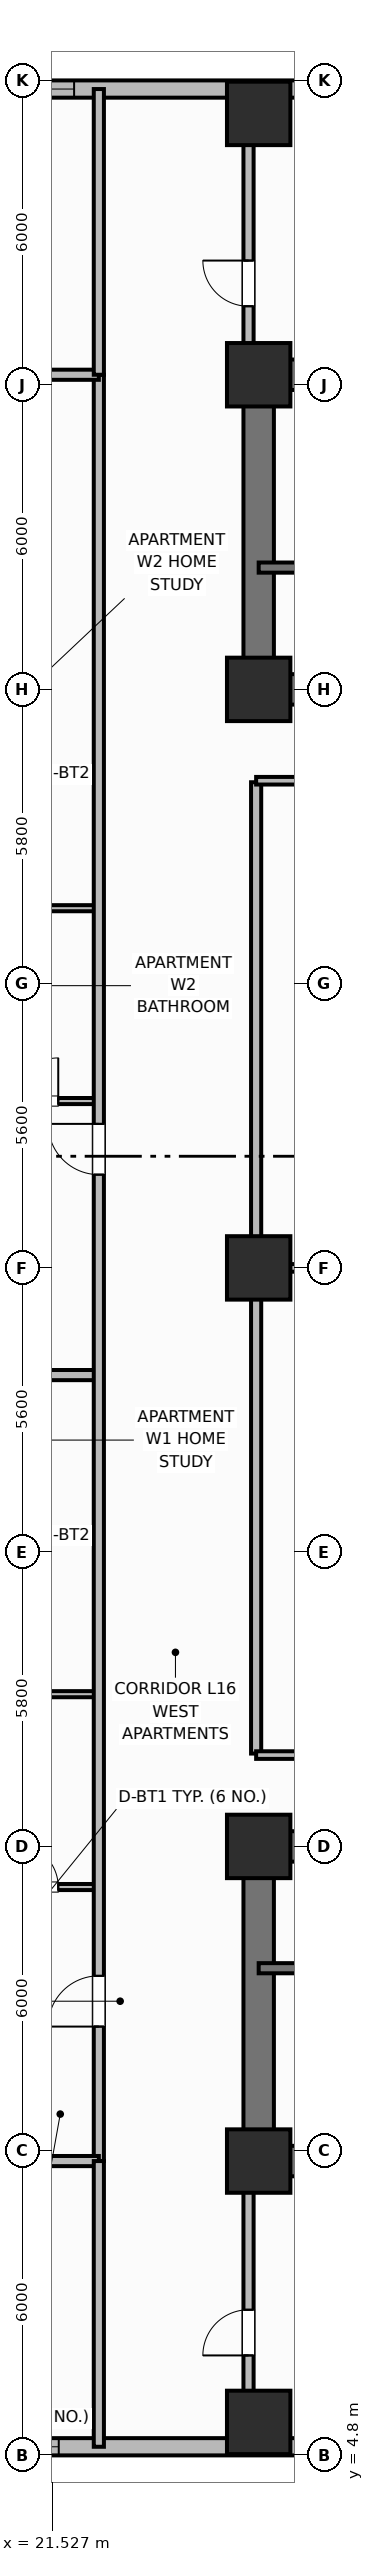
"""IFC4 building model, lengths in metres.
Left out: names, types, materials, properties, quantities, classifications, styles, units other than length and angle.
Written with IfcOpenShell. Run it as: python <this file> out.ifc"""

import sys

from ifc_helpers import new_model, si_unit, direction, frame, frame_2d, origin, origin_2d, place, context, subcontext, project, spatial, rectangle, extrude, element, fill, save


model = new_model("IFC4")
c1 = context("Model", 3, precision=1e-05, world=origin(), true_north=direction((0.0, 1.0)))
c2 = subcontext(c1, "Body", "Model", "MODEL_VIEW")
j1 = project(units=[si_unit("LENGTHUNIT", "METRE"), si_unit("PLANEANGLEUNIT", "RADIAN")], contexts=[c1])
p1 = place(None, origin())
s1 = spatial("IfcSite", under=j1, at=p1, CompositionType="ELEMENT")
p2 = place(p1, origin())
s2 = spatial("IfcBuilding", under=s1, at=p2, CompositionType="ELEMENT")
p3 = place(p2, frame((0.0, 0.0, 65.8)))
s3 = spatial("IfcBuildingStorey", under=s2, at=p3, CompositionType="ELEMENT", Elevation=65.8)
p4 = place(p3, frame((52.8, 10.6, 0.0), z_axis=(0.0, 0.0, 1.0), x_axis=(-1.0, 0.0, 0.0)))
e1 = element("IfcWall", 1, at=p4, inside=s3, PredefinedType="SHEAR", context=c2, shape_type="SweptSolid", body=[
    extrude(rectangle(XDim=27.2, YDim=0.6, at=frame_2d((13.6, 0.0))), origin(), (0.0, 0.0, 1.0), 3.7),
])
p5 = place(p3, frame((25.6, 10.9, 0.0), z_axis=(0.0, 0.0, 1.0), x_axis=(0.0, 1.0, 0.0)))
e2 = element("IfcWall", 2, at=p5, inside=s3, PredefinedType="SHEAR", context=c2, shape_type="SweptSolid", body=[
    extrude(rectangle(XDim=5.6, YDim=0.6, at=frame_2d((2.8, 0.0))), origin(), (0.0, 0.0, 1.0), 3.7),
])
p6 = place(p3, frame((25.6, 16.8, 0.0), z_axis=(0.0, 0.0, 1.0), x_axis=(1.0, 0.0, 0.0)))
e3 = element("IfcWall", 3, at=p6, inside=s3, PredefinedType="SHEAR", context=c2, shape_type="SweptSolid", body=[
    extrude(rectangle(XDim=27.2, YDim=0.6, at=frame_2d((13.6, 0.0))), origin(), (0.0, 0.0, 1.0), 3.7),
])
p7 = place(p6, frame((1.9, 0.0, 0.0)))
e4 = element("IfcOpeningElement", 4, at=p7, cuts=e3, PredefinedType="OPENING", context=c2, shape_type="SweptSolid", body=[
    extrude(rectangle(XDim=1.1, YDim=2.15, at=frame_2d((0.55, 1.075))), frame((0.0, 0.31, 0.0), z_axis=(0.0, -1.0, 0.0), x_axis=(1.0, 0.0, 0.0)), (0.0, 0.0, 1.0), 0.62),
])
p8 = place(p6, frame((13.0, 0.0, 0.0)))
e5 = element("IfcOpeningElement", 5, at=p8, cuts=e3, PredefinedType="OPENING", context=c2, shape_type="SweptSolid", body=[
    extrude(rectangle(XDim=1.2, YDim=2.15, at=frame_2d((0.6, 1.075))), frame((0.0, 0.31, 0.0), z_axis=(0.0, -1.0, 0.0), x_axis=(1.0, 0.0, 0.0)), (0.0, 0.0, 1.0), 0.62),
])
p9 = place(p6, frame((20.4, 0.0, 0.0)))
e6 = element("IfcOpeningElement", 6, at=p9, cuts=e3, PredefinedType="OPENING", context=c2, shape_type="SweptSolid", body=[
    extrude(rectangle(XDim=1.3, YDim=2.2, at=frame_2d((0.65, 1.1))), frame((0.0, 0.31, 0.0), z_axis=(0.0, -1.0, 0.0), x_axis=(1.0, 0.0, 0.0)), (0.0, 0.0, 1.0), 0.62),
])
p10 = place(p6, frame((24.65, 0.0, 0.0)))
e7 = element("IfcOpeningElement", 7, at=p10, cuts=e3, PredefinedType="OPENING", context=c2, shape_type="SweptSolid", body=[
    extrude(rectangle(XDim=0.85, YDim=2.1, at=frame_2d((0.425, 1.05))), frame((0.0, 0.31, 0.0), z_axis=(0.0, -1.0, 0.0), x_axis=(1.0, 0.0, 0.0)), (0.0, 0.0, 1.0), 0.62),
])
p11 = place(p3, frame((25.6, 45.8, 0.0), z_axis=(0.0, 0.0, 1.0), x_axis=(1.0, 0.0, 0.0)))
e8 = element("IfcWall", 8, at=p11, inside=s3, PredefinedType="SHEAR", context=c2, shape_type="SweptSolid", body=[
    extrude(rectangle(XDim=27.2, YDim=0.6, at=frame_2d((13.6, 0.0))), origin(), (0.0, 0.0, 1.0), 3.7),
])
p12 = place(p3, frame((25.6, 39.9, 0.0), z_axis=(0.0, 0.0, 1.0), x_axis=(0.0, 1.0, 0.0)))
e9 = element("IfcWall", 9, at=p12, inside=s3, PredefinedType="SHEAR", context=c2, shape_type="SweptSolid", body=[
    extrude(rectangle(XDim=5.6, YDim=0.6, at=frame_2d((2.8, 0.0))), origin(), (0.0, 0.0, 1.0), 3.7),
])
p13 = place(p3, frame((52.8, 39.6, 0.0), z_axis=(0.0, 0.0, 1.0), x_axis=(-1.0, 0.0, 0.0)))
e10 = element("IfcWall", 10, at=p13, inside=s3, PredefinedType="SHEAR", context=c2, shape_type="SweptSolid", body=[
    extrude(rectangle(XDim=27.2, YDim=0.6, at=frame_2d((13.6, 0.0))), origin(), (0.0, 0.0, 1.0), 3.7),
])
p14 = place(p13, frame((24.2, 0.0, 0.0)))
e11 = element("IfcOpeningElement", 11, at=p14, cuts=e10, PredefinedType="OPENING", context=c2, shape_type="SweptSolid", body=[
    extrude(rectangle(XDim=1.1, YDim=2.15, at=frame_2d((0.55, 1.075))), frame((0.0, 0.31, 0.0), z_axis=(0.0, -1.0, 0.0), x_axis=(1.0, 0.0, 0.0)), (0.0, 0.0, 1.0), 0.62),
])
p15 = place(p13, frame((15.1, 0.0, 0.0)))
e12 = element("IfcOpeningElement", 12, at=p15, cuts=e10, PredefinedType="OPENING", context=c2, shape_type="SweptSolid", body=[
    extrude(rectangle(XDim=1.2, YDim=2.15, at=frame_2d((0.6, 1.075))), frame((0.0, 0.31, 0.0), z_axis=(0.0, -1.0, 0.0), x_axis=(1.0, 0.0, 0.0)), (0.0, 0.0, 1.0), 0.62),
])
p16 = place(p13, frame((11.6, 0.0, 0.0)))
e13 = element("IfcOpeningElement", 13, at=p16, cuts=e10, PredefinedType="OPENING", context=c2, shape_type="SweptSolid", body=[
    extrude(rectangle(XDim=0.9, YDim=2.1, at=frame_2d((0.45, 1.05))), frame((0.0, 0.31, 0.0), z_axis=(0.0, -1.0, 0.0), x_axis=(1.0, 0.0, 0.0)), (0.0, 0.0, 1.0), 0.62),
])
p17 = place(p13, frame((3.6, 0.0, 0.0)))
e14 = element("IfcOpeningElement", 14, at=p17, cuts=e10, PredefinedType="OPENING", context=c2, shape_type="SweptSolid", body=[
    extrude(rectangle(XDim=1.0, YDim=2.15, at=frame_2d((0.5, 1.075))), frame((0.0, 0.31, 0.0), z_axis=(0.0, -1.0, 0.0), x_axis=(1.0, 0.0, 0.0)), (0.0, 0.0, 1.0), 0.62),
])
for number, where, z_axis, x_axis in (
    (15, (25.6, 10.6, 0.0), (0.0, 0.0, 1.0), (1.0, 0.0, 0.0)),
    (16, (25.6, 16.8, 0.0), (0.0, 0.0, 1.0), (1.0, 0.0, 0.0)),
    (17, (25.6, 39.6, 0.0), (0.0, 0.0, 1.0), (1.0, 0.0, 0.0)),
    (18, (25.6, 45.8, 0.0), (0.0, 0.0, 1.0), (1.0, 0.0, 0.0)),
    (19, (25.6, 28.2, 0.0), (0.0, 0.0, 1.0), (1.0, 0.0, 0.0)),
    (20, (25.6, 5.45, 0.0), (0.0, 0.0, 1.0), (1.0, 0.0, 0.0)),
    (21, (25.6, 50.95, 0.0), (0.0, 0.0, 1.0), (1.0, 0.0, 0.0)),
):
    element("IfcColumn", number, at=place(p3, frame(where, z_axis=z_axis, x_axis=x_axis)), inside=s3, PredefinedType="COLUMN", context=c2, shape_type="SweptSolid", body=[
        extrude(rectangle(XDim=1.25, YDim=1.25, at=origin_2d()), origin(), (0.0, 0.0, 1.0), 3.7),
    ])
p18 = place(p3, frame((18.6, 4.97, 0.0), z_axis=(0.0, 0.0, 1.0), x_axis=(1.0, 0.0, 0.0)))
e22 = element("IfcWall", 22, at=p18, inside=s3, PredefinedType="SOLIDWALL", context=c2, shape_type="SweptSolid", body=[
    extrude(rectangle(XDim=17.4, YDim=0.34, at=frame_2d((8.7, 0.0))), origin(), (0.0, 0.0, 1.0), 2.7),
])
p19 = place(p18, frame((1.46, 0.0, 0.68)))
e23 = element("IfcOpeningElement", 23, at=p19, cuts=e22, PredefinedType="OPENING", context=c2, shape_type="SweptSolid", body=[
    extrude(rectangle(XDim=1.6, YDim=1.9, at=frame_2d((0.8, 0.95))), frame((0.0, 0.18, 0.0), z_axis=(0.0, -1.0, 0.0), x_axis=(1.0, 0.0, 0.0)), (0.0, 0.0, 1.0), 0.36),
])
p20 = place(p18, frame((8.25, 0.0, 0.68)))
e24 = element("IfcOpeningElement", 24, at=p20, cuts=e22, PredefinedType="OPENING", context=c2, shape_type="SweptSolid", body=[
    extrude(rectangle(XDim=1.6, YDim=1.9, at=frame_2d((0.8, 0.95))), frame((0.0, 0.18, 0.0), z_axis=(0.0, -1.0, 0.0), x_axis=(1.0, 0.0, 0.0)), (0.0, 0.0, 1.0), 0.36),
])
p21 = place(p18, frame((13.64, 0.0, 0.68)))
e25 = element("IfcOpeningElement", 25, at=p21, cuts=e22, PredefinedType="OPENING", context=c2, shape_type="SweptSolid", body=[
    extrude(rectangle(XDim=1.6, YDim=1.9, at=frame_2d((0.8, 0.95))), frame((0.0, 0.18, 0.0), z_axis=(0.0, -1.0, 0.0), x_axis=(1.0, 0.0, 0.0)), (0.0, 0.0, 1.0), 0.36),
])
p22 = place(p3, frame((36.0, 51.43, 0.0), z_axis=(0.0, 0.0, 1.0), x_axis=(-1.0, 0.0, 0.0)))
e26 = element("IfcWall", 26, at=p22, inside=s3, PredefinedType="SOLIDWALL", context=c2, shape_type="SweptSolid", body=[
    extrude(rectangle(XDim=17.4, YDim=0.34, at=frame_2d((8.7, 0.0))), origin(), (0.0, 0.0, 1.0), 2.7),
])
p23 = place(p22, frame((5.637, 0.0, 0.68)))
e27 = element("IfcOpeningElement", 27, at=p23, cuts=e26, PredefinedType="OPENING", context=c2, shape_type="SweptSolid", body=[
    extrude(rectangle(XDim=2.1, YDim=1.9, at=frame_2d((1.05, 0.95))), frame((0.0, 0.18, 0.0), z_axis=(0.0, -1.0, 0.0), x_axis=(1.0, 0.0, 0.0)), (0.0, 0.0, 1.0), 0.36),
])
p24 = place(p22, frame((14.038, 0.0, 0.68)))
e28 = element("IfcOpeningElement", 28, at=p24, cuts=e26, PredefinedType="OPENING", context=c2, shape_type="SweptSolid", body=[
    extrude(rectangle(XDim=2.1, YDim=1.9, at=frame_2d((1.05, 0.95))), frame((0.0, 0.18, 0.0), z_axis=(0.0, -1.0, 0.0), x_axis=(1.0, 0.0, 0.0)), (0.0, 0.0, 1.0), 0.36),
])
p25 = place(p3, frame((25.6, 14.4, 0.0), z_axis=(0.0, 0.0, 1.0), x_axis=(1.0, 0.0, 0.0)))
e29 = element("IfcWall", 29, at=p25, inside=s3, PredefinedType="SHEAR", context=c2, shape_type="SweptSolid", body=[
    extrude(rectangle(XDim=9.55, YDim=0.2, at=frame_2d((4.775, 0.0))), origin(), (0.0, 0.0, 1.0), 3.7),
])
p26 = place(p25, frame((1.05, 0.0, 0.0)))
e30 = element("IfcOpeningElement", 30, at=p26, cuts=e29, PredefinedType="OPENING", context=c2, shape_type="SweptSolid", body=[
    extrude(rectangle(XDim=1.1, YDim=2.15, at=frame_2d((0.55, 1.075))), frame((0.0, 0.11, 0.0), z_axis=(0.0, -1.0, 0.0), x_axis=(1.0, 0.0, 0.0)), (0.0, 0.0, 1.0), 0.22),
])
p27 = place(p3, frame((35.15, 42.0, 0.0), z_axis=(0.0, 0.0, 1.0), x_axis=(-1.0, 0.0, 0.0)))
e31 = element("IfcWall", 31, at=p27, inside=s3, PredefinedType="SHEAR", context=c2, shape_type="SweptSolid", body=[
    extrude(rectangle(XDim=9.55, YDim=0.2, at=frame_2d((4.775, 0.0))), origin(), (0.0, 0.0, 1.0), 3.7),
])
p28 = place(p27, frame((7.25, 0.0, 0.0)))
e32 = element("IfcOpeningElement", 32, at=p28, cuts=e31, PredefinedType="OPENING", context=c2, shape_type="SweptSolid", body=[
    extrude(rectangle(XDim=1.1, YDim=2.15, at=frame_2d((0.55, 1.075))), frame((0.0, 0.11, 0.0), z_axis=(0.0, -1.0, 0.0), x_axis=(1.0, 0.0, 0.0)), (0.0, 0.0, 1.0), 0.22),
])
p29 = place(p3, frame((25.55, 18.63, 0.0), z_axis=(0.0, 0.0, 1.0), x_axis=(0.0, 1.0, 0.0)))
e33 = element("IfcWall", 33, at=p29, inside=s3, PredefinedType="PARTITIONING", context=c2, shape_type="SweptSolid", body=[
    extrude(rectangle(XDim=19.14, YDim=0.2, at=frame_2d((9.57, 0.0))), origin(), (0.0, 0.0, 1.0), 2.53),
])
for number, where, z_axis, x_axis in (
    (34, (25.55, 18.6, 0.0), (0.0, 0.0, 1.0), (1.0, 0.0, 0.0)),
    (35, (25.55, 37.8, 0.0), (0.0, 0.0, 1.0), (1.0, 0.0, 0.0)),
):
    element("IfcWall", number, at=place(p3, frame(where, z_axis=z_axis, x_axis=x_axis)), inside=s3, PredefinedType="PARTITIONING", context=c2, shape_type="SweptSolid", body=[
        extrude(rectangle(XDim=14.9, YDim=0.15, at=frame_2d((7.45, 0.0))), origin(), (0.0, 0.0, 1.0), 2.53),
    ])
p30 = place(p3, frame((25.6, 28.2, 0.0), z_axis=(0.0, 0.0, 1.0), x_axis=(1.0, 0.0, 0.0)))
e36 = element("IfcWall", 36, at=p30, inside=s3, PredefinedType="PARTITIONING", context=c2, shape_type="SweptSolid", body=[
    extrude(rectangle(XDim=14.87, YDim=0.15, at=frame_2d((7.435, 0.0))), origin(), (0.0, 0.0, 1.0), 2.53),
])
p31 = place(p3, frame((20.2, 16.0, 0.0), z_axis=(0.0, 0.0, 1.0), x_axis=(1.0, 0.0, 0.0)))
e37 = element("IfcWall", 37, at=p31, inside=s3, PredefinedType="PARTITIONING", context=c2, shape_type="SweptSolid", body=[
    extrude(rectangle(XDim=2.25, YDim=0.12, at=frame_2d((1.125, 0.0))), origin(), (0.0, 0.0, 1.0), 2.53),
])
p32 = place(p31, frame((0.6, 0.0, 0.0)))
e38 = element("IfcOpeningElement", 38, at=p32, cuts=e37, PredefinedType="OPENING", context=c2, shape_type="SweptSolid", body=[
    extrude(rectangle(XDim=0.85, YDim=2.1, at=frame_2d((0.425, 1.05))), frame((0.0, 0.07, 0.0), z_axis=(0.0, -1.0, 0.0), x_axis=(1.0, 0.0, 0.0)), (0.0, 0.0, 1.0), 0.14),
])
p33 = place(p3, frame((20.2, 19.8, 0.0), z_axis=(0.0, 0.0, 1.0), x_axis=(1.0, 0.0, 0.0)))
e39 = element("IfcWall", 39, at=p33, inside=s3, PredefinedType="PARTITIONING", context=c2, shape_type="SweptSolid", body=[
    extrude(rectangle(XDim=2.25, YDim=0.12, at=frame_2d((1.125, 0.0))), origin(), (0.0, 0.0, 1.0), 2.53),
])
p34 = place(p3, frame((15.226, 26.088, 0.0), z_axis=(0.0, 0.0, 1.0), x_axis=(1.0, 0.0, 0.0)))
e40 = element("IfcWall", 40, at=p34, inside=s3, PredefinedType="PARTITIONING", context=c2, shape_type="SweptSolid", body=[
    extrude(rectangle(XDim=7.224, YDim=0.2, at=frame_2d((3.612, 0.0))), origin(), (0.0, 0.0, 1.0), 2.53),
])
p35 = place(p3, frame((20.2, 31.488, 0.0), z_axis=(0.0, 0.0, 1.0), x_axis=(1.0, 0.0, 0.0)))
e41 = element("IfcWall", 41, at=p35, inside=s3, PredefinedType="PARTITIONING", context=c2, shape_type="SweptSolid", body=[
    extrude(rectangle(XDim=2.25, YDim=0.12, at=frame_2d((1.125, 0.0))), origin(), (0.0, 0.0, 1.0), 2.53),
])
p36 = place(p35, frame((0.6, 0.0, 0.0)))
e42 = element("IfcOpeningElement", 42, at=p36, cuts=e41, PredefinedType="OPENING", context=c2, shape_type="SweptSolid", body=[
    extrude(rectangle(XDim=0.85, YDim=2.1, at=frame_2d((0.425, 1.05))), frame((0.0, 0.07, 0.0), z_axis=(0.0, -1.0, 0.0), x_axis=(1.0, 0.0, 0.0)), (0.0, 0.0, 1.0), 0.14),
])
p37 = place(p3, frame((20.2, 35.288, 0.0), z_axis=(0.0, 0.0, 1.0), x_axis=(1.0, 0.0, 0.0)))
e43 = element("IfcWall", 43, at=p37, inside=s3, PredefinedType="PARTITIONING", context=c2, shape_type="SweptSolid", body=[
    extrude(rectangle(XDim=2.25, YDim=0.12, at=frame_2d((1.125, 0.0))), origin(), (0.0, 0.0, 1.0), 2.53),
])
p38 = place(p3, frame((22.45, 10.6, 0.0), z_axis=(0.0, 0.0, 1.0), x_axis=(0.0, 1.0, 0.0)))
e44 = element("IfcWall", 44, at=p38, inside=s3, PredefinedType="PARTITIONING", context=c2, shape_type="SweptSolid", body=[
    extrude(rectangle(XDim=35.2, YDim=0.2, at=frame_2d((17.6, 0.0))), origin(), (0.0, 0.0, 1.0), 2.53),
])
p39 = place(p38, frame((2.65, 0.0, 0.0)))
e45 = element("IfcOpeningElement", 45, at=p39, cuts=e44, PredefinedType="OPENING", context=c2, shape_type="SweptSolid", body=[
    extrude(rectangle(XDim=1.0, YDim=2.15, at=frame_2d((0.5, 1.075))), frame((0.0, 0.11, 0.0), z_axis=(0.0, -1.0, 0.0), x_axis=(1.0, 0.0, 0.0)), (0.0, 0.0, 1.0), 0.22),
])
p40 = place(p38, frame((19.438, 0.0, 0.0)))
e46 = element("IfcOpeningElement", 46, at=p40, cuts=e44, PredefinedType="OPENING", context=c2, shape_type="SweptSolid", body=[
    extrude(rectangle(XDim=1.0, YDim=2.15, at=frame_2d((0.5, 1.075))), frame((0.0, 0.11, 0.0), z_axis=(0.0, -1.0, 0.0), x_axis=(1.0, 0.0, 0.0)), (0.0, 0.0, 1.0), 0.22),
])
for number, where, z_axis, x_axis in (
    (47, (14.99, 10.6, 0.0), (0.0, 0.0, 1.0), (1.0, 0.0, 0.0)),
    (48, (14.99, 45.8, 0.0), (0.0, 0.0, 1.0), (1.0, 0.0, 0.0)),
):
    element("IfcWall", number, at=place(p3, frame(where, z_axis=z_axis, x_axis=x_axis)), inside=s3, PredefinedType="PARTITIONING", context=c2, shape_type="SweptSolid", body=[
        extrude(rectangle(XDim=7.46, YDim=0.2, at=frame_2d((3.73, 0.0))), origin(), (0.0, 0.0, 1.0), 2.53),
    ])
p41 = place(p3, frame((22.45, 4.97, 0.0), z_axis=(0.0, 0.0, 1.0), x_axis=(0.0, 1.0, 0.0)))
e49 = element("IfcWall", 49, at=p41, inside=s3, PredefinedType="PARTITIONING", context=c2, shape_type="SweptSolid", body=[
    extrude(rectangle(XDim=5.63, YDim=0.2, at=frame_2d((2.815, 0.0))), origin(), (0.0, 0.0, 1.0), 2.53),
])
p42 = place(p3, frame((22.45, 45.8, 0.0), z_axis=(0.0, 0.0, 1.0), x_axis=(0.0, 1.0, 0.0)))
e50 = element("IfcWall", 50, at=p42, inside=s3, PredefinedType="PARTITIONING", context=c2, shape_type="SweptSolid", body=[
    extrude(rectangle(XDim=5.63, YDim=0.2, at=frame_2d((2.815, 0.0))), origin(), (0.0, 0.0, 1.0), 2.53),
])
p43 = place(p3, frame((25.4, 5.72, 0.0), z_axis=(0.0, 0.0, 1.0), x_axis=(0.0, 1.0, 0.0)))
e51 = element("IfcWall", 51, at=p43, inside=s3, PredefinedType="PARTITIONING", context=c2, shape_type="SweptSolid", body=[
    extrude(rectangle(XDim=4.58, YDim=0.2, at=frame_2d((2.29, 0.0))), origin(), (0.0, 0.0, 1.0), 2.53),
])
p44 = place(p43, frame((1.05, 0.0, 0.0)))
e52 = element("IfcOpeningElement", 52, at=p44, cuts=e51, PredefinedType="OPENING", context=c2, shape_type="SweptSolid", body=[
    extrude(rectangle(XDim=0.9, YDim=2.1, at=frame_2d((0.45, 1.05))), frame((0.0, 0.11, 0.0), z_axis=(0.0, -1.0, 0.0), x_axis=(1.0, 0.0, 0.0)), (0.0, 0.0, 1.0), 0.22),
])
p45 = place(p3, frame((25.4, 46.1, 0.0), z_axis=(0.0, 0.0, 1.0), x_axis=(0.0, 1.0, 0.0)))
e53 = element("IfcWall", 53, at=p45, inside=s3, PredefinedType="PARTITIONING", context=c2, shape_type="SweptSolid", body=[
    extrude(rectangle(XDim=4.58, YDim=0.2, at=frame_2d((2.29, 0.0))), origin(), (0.0, 0.0, 1.0), 2.53),
])
p46 = place(p45, frame((1.05, 0.0, 0.0)))
e54 = element("IfcOpeningElement", 54, at=p46, cuts=e53, PredefinedType="OPENING", context=c2, shape_type="SweptSolid", body=[
    extrude(rectangle(XDim=0.9, YDim=2.1, at=frame_2d((0.45, 1.05))), frame((0.0, 0.11, 0.0), z_axis=(0.0, -1.0, 0.0), x_axis=(1.0, 0.0, 0.0)), (0.0, 0.0, 1.0), 0.22),
])
p47 = place(p19, origin())
e55 = element("IfcWindow", 55, at=p47, inside=s3, PartitioningType="SINGLE_PANEL", PredefinedType="WINDOW", context=c2, shape_type="SweptSolid", body=[
    extrude(rectangle(XDim=1.6, YDim=1.9, at=frame_2d((0.8, 0.95))), frame((0.0, 0.03, 0.0), z_axis=(0.0, -1.0, 0.0), x_axis=(1.0, 0.0, 0.0)), (0.0, 0.0, 1.0), 0.06),
])
fill(e23, e55)
p48 = place(p24, origin())
e56 = element("IfcWindow", 56, at=p48, inside=s3, PartitioningType="SINGLE_PANEL", PredefinedType="WINDOW", context=c2, shape_type="SweptSolid", body=[
    extrude(rectangle(XDim=2.1, YDim=1.9, at=frame_2d((1.05, 0.95))), frame((0.0, 0.03, 0.0), z_axis=(0.0, -1.0, 0.0), x_axis=(1.0, 0.0, 0.0)), (0.0, 0.0, 1.0), 0.06),
])
fill(e28, e56)
p49 = place(p32, origin())
e57 = element("IfcDoor", 57, at=p49, inside=s3, OperationType="SINGLE_SWING_LEFT", PredefinedType="DOOR", context=c2, shape_type="SweptSolid", body=[
    extrude(rectangle(XDim=0.85, YDim=2.1, at=frame_2d((0.425, 1.05))), frame((0.0, 0.025, 0.0), z_axis=(0.0, -1.0, 0.0), x_axis=(1.0, 0.0, 0.0)), (0.0, 0.0, 1.0), 0.05),
])
fill(e38, e57)
p50 = place(p36, origin())
e58 = element("IfcDoor", 58, at=p50, inside=s3, OperationType="SINGLE_SWING_RIGHT", PredefinedType="DOOR", context=c2, shape_type="SweptSolid", body=[
    extrude(rectangle(XDim=0.85, YDim=2.1, at=frame_2d((0.425, 1.05))), frame((0.0, 0.025, 0.0), z_axis=(0.0, -1.0, 0.0), x_axis=(1.0, 0.0, 0.0)), (0.0, 0.0, 1.0), 0.05),
])
fill(e42, e58)
p51 = place(p39, origin())
e59 = element("IfcDoor", 59, at=p51, inside=s3, OperationType="SINGLE_SWING_LEFT", PredefinedType="DOOR", context=c2, shape_type="SweptSolid", body=[
    extrude(rectangle(XDim=1.0, YDim=2.15, at=frame_2d((0.5, 1.075))), frame((0.0, 0.025, 0.0), z_axis=(0.0, -1.0, 0.0), x_axis=(1.0, 0.0, 0.0)), (0.0, 0.0, 1.0), 0.05),
])
fill(e45, e59)
p52 = place(p40, origin())
e60 = element("IfcDoor", 60, at=p52, inside=s3, OperationType="SINGLE_SWING_RIGHT", PredefinedType="DOOR", context=c2, shape_type="SweptSolid", body=[
    extrude(rectangle(XDim=1.0, YDim=2.15, at=frame_2d((0.5, 1.075))), frame((0.0, 0.025, 0.0), z_axis=(0.0, -1.0, 0.0), x_axis=(1.0, 0.0, 0.0)), (0.0, 0.0, 1.0), 0.05),
])
fill(e46, e60)
p53 = place(p44, origin())
e61 = element("IfcDoor", 61, at=p53, inside=s3, OperationType="SINGLE_SWING_LEFT", PredefinedType="DOOR", context=c2, shape_type="SweptSolid", body=[
    extrude(rectangle(XDim=0.9, YDim=2.1, at=frame_2d((0.45, 1.05))), frame((0.0, 0.025, 0.0), z_axis=(0.0, -1.0, 0.0), x_axis=(1.0, 0.0, 0.0)), (0.0, 0.0, 1.0), 0.05),
])
fill(e52, e61)
p54 = place(p46, origin())
e62 = element("IfcDoor", 62, at=p54, inside=s3, OperationType="SINGLE_SWING_RIGHT", PredefinedType="DOOR", context=c2, shape_type="SweptSolid", body=[
    extrude(rectangle(XDim=0.9, YDim=2.1, at=frame_2d((0.45, 1.05))), frame((0.0, 0.025, 0.0), z_axis=(0.0, -1.0, 0.0), x_axis=(1.0, 0.0, 0.0)), (0.0, 0.0, 1.0), 0.05),
])
fill(e54, e62)
save(model, sys.argv[1])
